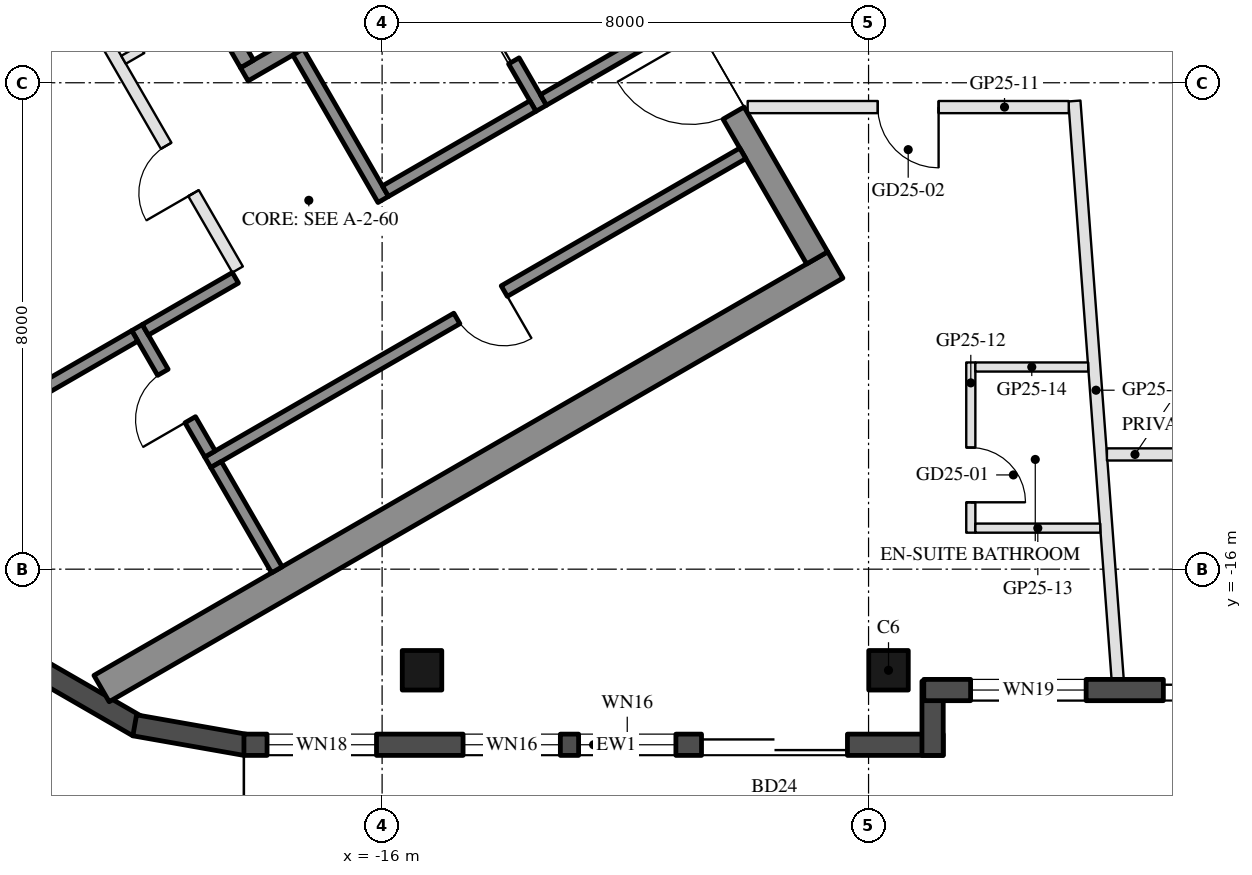
"""IFC4 building model, lengths in metres.
Left out: names, types, materials, properties, quantities, classifications, styles, units other than length and angle.
Written with IfcOpenShell. Run it as: python <this file> out.ifc"""

import sys

from ifc_helpers import new_model, si_unit, direction, frame, frame_2d, origin, origin_2d, place, context, subcontext, project, spatial, rectangle, hollow_rectangle, extrude, boolean, halfspace, element, fill, save


model = new_model("IFC4")
c1 = context("Model", 3, precision=1e-05, world=origin(), true_north=direction((0.0, 1.0)))
c2 = subcontext(c1, "Body", "Model", "MODEL_VIEW")
j1 = project(units=[si_unit("LENGTHUNIT", "METRE"), si_unit("PLANEANGLEUNIT", "RADIAN")], contexts=[c1])
p1 = place(None, origin())
s1 = spatial("IfcSite", under=j1, at=p1, CompositionType="ELEMENT")
p2 = place(p1, origin())
s2 = spatial("IfcBuilding", under=s1, at=p2, CompositionType="ELEMENT")
p3 = place(p2, frame((0.0, 0.0, 261.5)))
s3 = spatial("IfcBuildingStorey", under=s2, at=p3, CompositionType="ELEMENT", Elevation=261.5)
p4 = place(p3, frame((-15.344, -17.663, 0.0), z_axis=(0.0, 0.0, 1.0), x_axis=(-1.0, 0.0, 0.0)))
e1 = element("IfcColumn", 1, at=p4, inside=s3, PredefinedType="COLUMN", context=c2, shape_type="SweptSolid", body=[
    boolean("DIFFERENCE", extrude(hollow_rectangle(XDim=0.65, YDim=0.65, WallThickness=0.03, at=origin_2d()), origin(), (0.0, 0.0, 1.0), 3.7), halfspace(frame((0.0, 0.0, 3.653), z_axis=(0.0, 0.0, 1.0), x_axis=(1.0, 0.0, 0.0)), False)),
])
p5 = place(p3, frame((-7.672, -17.663, 0.0), z_axis=(0.0, 0.0, 1.0), x_axis=(-1.0, 0.0, 0.0)))
e2 = element("IfcColumn", 2, at=p5, inside=s3, PredefinedType="COLUMN", context=c2, shape_type="SweptSolid", body=[
    boolean("DIFFERENCE", extrude(hollow_rectangle(XDim=0.65, YDim=0.65, WallThickness=0.03, at=origin_2d()), origin(), (0.0, 0.0, 1.0), 3.7), halfspace(frame((0.0, 0.0, 3.66), z_axis=(0.0, 0.0, 1.0), x_axis=(1.0, 0.0, 0.0)), False)),
])
p6 = place(p3, frame((-21.618, -17.662, 0.0), z_axis=(0.0, 0.0, 1.0), x_axis=(0.866080385203, -0.499904757295, 0.0)))
e3 = element("IfcWall", 3, at=p6, inside=s3, PredefinedType="SOLIDWALL", context=c2, shape_type="SweptSolid", body=[
    extrude(rectangle(XDim=1.855, YDim=0.35, at=frame_2d((0.927, 0.0))), origin(), (0.0, 0.0, 1.0), 3.55),
])
p7 = place(p3, frame((-20.069, -18.568, 0.0), z_axis=(0.0, 0.0, 1.0), x_axis=(0.984791508075, -0.173740282098, 0.0)))
e4 = element("IfcWall", 4, at=p7, inside=s3, PredefinedType="SOLIDWALL", context=c2, shape_type="SweptSolid", body=[
    extrude(rectangle(XDim=1.855, YDim=0.35, at=frame_2d((0.927, 0.0))), origin(), (0.0, 0.0, 1.0), 3.55),
])
p8 = place(p3, frame((-18.272, -18.888, 0.0), z_axis=(0.0, 0.0, 1.0), x_axis=(1.0, 0.0, 0.0)))
e5 = element("IfcWall", 5, at=p8, inside=s3, PredefinedType="SOLIDWALL", context=c2, shape_type="SweptSolid", body=[
    extrude(rectangle(XDim=11.5, YDim=0.35, at=frame_2d((5.75, 0.0))), origin(), (0.0, 0.0, 1.0), 3.55),
])
p9 = place(p8, frame((0.38, 0.0, 0.3)))
e6 = element("IfcOpeningElement", 6, at=p9, cuts=e5, PredefinedType="OPENING", context=c2, shape_type="SweptSolid", body=[
    extrude(rectangle(XDim=1.8, YDim=2.65, at=frame_2d((0.9, 1.325))), frame((0.0, 0.185, 0.0), z_axis=(0.0, -1.0, 0.0), x_axis=(1.0, 0.0, 0.0)), (0.0, 0.0, 1.0), 0.37),
])
p10 = place(p8, frame((7.525, 0.0, 0.0)))
e7 = element("IfcOpeningElement", 7, at=p10, cuts=e5, PredefinedType="OPENING", context=c2, shape_type="SweptSolid", body=[
    extrude(rectangle(XDim=2.4, YDim=2.4, at=frame_2d((1.2, 1.2))), frame((0.0, 0.185, 0.0), z_axis=(0.0, -1.0, 0.0), x_axis=(1.0, 0.0, 0.0)), (0.0, 0.0, 1.0), 0.37),
])
p11 = place(p8, frame((3.604, 0.0, 0.3)))
e8 = element("IfcOpeningElement", 8, at=p11, cuts=e5, PredefinedType="OPENING", context=c2, shape_type="SweptSolid", body=[
    extrude(rectangle(XDim=1.6, YDim=2.65, at=frame_2d((0.8, 1.325))), frame((0.0, 0.185, 0.0), z_axis=(0.0, -1.0, 0.0), x_axis=(1.0, 0.0, 0.0)), (0.0, 0.0, 1.0), 0.37),
])
p12 = place(p8, frame((5.504, 0.0, 0.3)))
e9 = element("IfcOpeningElement", 9, at=p12, cuts=e5, PredefinedType="OPENING", context=c2, shape_type="SweptSolid", body=[
    extrude(rectangle(XDim=1.6, YDim=2.65, at=frame_2d((0.8, 1.325))), frame((0.0, 0.185, 0.0), z_axis=(0.0, -1.0, 0.0), x_axis=(1.0, 0.0, 0.0)), (0.0, 0.0, 1.0), 0.37),
])
p13 = place(p3, frame((-6.947, -19.063, 0.0), z_axis=(0.0, 0.0, 1.0), x_axis=(0.0, 1.0, 0.0)))
e10 = element("IfcWall", 10, at=p13, inside=s3, PredefinedType="SOLIDWALL", context=c2, shape_type="SweptSolid", body=[
    extrude(rectangle(XDim=1.22, YDim=0.35, at=frame_2d((0.61, 0.0))), origin(), (0.0, 0.0, 1.0), 3.55),
])
p14 = place(p3, frame((-7.092, -17.988, 0.0), z_axis=(0.0, 0.0, 1.0), x_axis=(1.0, 0.0, 0.0)))
e11 = element("IfcWall", 11, at=p14, inside=s3, PredefinedType="SOLIDWALL", context=c2, shape_type="SweptSolid", body=[
    extrude(rectangle(XDim=6.512, YDim=0.35, at=frame_2d((3.256, 0.0))), origin(), (0.0, 0.0, 1.0), 3.55),
])
p15 = place(p14, frame((0.77, 0.0, 0.3)))
e12 = element("IfcOpeningElement", 12, at=p15, cuts=e11, PredefinedType="OPENING", context=c2, shape_type="SweptSolid", body=[
    extrude(rectangle(XDim=1.9, YDim=2.65, at=frame_2d((0.95, 1.325))), frame((0.0, 0.185, 0.0), z_axis=(0.0, -1.0, 0.0), x_axis=(1.0, 0.0, 0.0)), (0.0, 0.0, 1.0), 0.37),
])
p16 = place(p14, frame((3.94, 0.0, 0.0)))
e13 = element("IfcOpeningElement", 13, at=p16, cuts=e11, PredefinedType="OPENING", context=c2, shape_type="SweptSolid", body=[
    extrude(rectangle(XDim=1.5, YDim=2.4, at=frame_2d((0.75, 1.2))), frame((0.0, 0.185, 0.0), z_axis=(0.0, -1.0, 0.0), x_axis=(1.0, 0.0, 0.0)), (0.0, 0.0, 1.0), 0.37),
])
for number, where, z_axis, x_axis in (
    (14, (-13.797, -1.903, 0.0), (0.0, 0.0, 1.0), (-0.866, -0.5, 0.0)),
    (15, (-8.547, -10.997, 0.0), (0.0, 0.0, 1.0), (-0.866, -0.5, 0.0)),
):
    element("IfcWall", number, at=place(p3, frame(where, z_axis=z_axis, x_axis=x_axis)), inside=s3, PredefinedType="SHEAR", context=c2, shape_type="SweptSolid", body=[
        extrude(rectangle(XDim=13.934, YDim=0.5, at=frame_2d((6.967, 0.0))), origin(), (0.0, 0.0, 1.0), 3.5),
    ])
p17 = place(p3, frame((-13.845, -2.22, 0.0), z_axis=(0.0, 0.0, 1.0), x_axis=(0.500004234368, -0.866022959057, 0.0)))
e16 = element("IfcWall", 16, at=p17, inside=s3, PredefinedType="SHEAR", context=c2, shape_type="SweptSolid", body=[
    extrude(rectangle(XDim=10.0, YDim=0.4, at=frame_2d((5.0, 0.0))), origin(), (0.0, 0.0, 1.0), 3.5),
])
p18 = place(p17, frame((3.55, 0.0, 0.0)))
e17 = element("IfcOpeningElement", 17, at=p18, cuts=e16, PredefinedType="OPENING", context=c2, shape_type="SweptSolid", body=[
    extrude(rectangle(XDim=1.1, YDim=2.1, at=frame_2d((0.55, 1.05))), frame((0.0, 0.21, 0.0), z_axis=(0.0, -1.0, 0.0), x_axis=(1.0, 0.0, 0.0)), (0.0, 0.0, 1.0), 0.42),
])
p19 = place(p17, frame((5.85, 0.0, 0.0)))
e18 = element("IfcOpeningElement", 18, at=p19, cuts=e16, PredefinedType="OPENING", context=c2, shape_type="SweptSolid", body=[
    extrude(rectangle(XDim=1.4, YDim=2.1, at=frame_2d((0.7, 1.05))), frame((0.0, 0.21, 0.0), z_axis=(0.0, -1.0, 0.0), x_axis=(1.0, 0.0, 0.0)), (0.0, 0.0, 1.0), 0.42),
])
p20 = place(p3, frame((-12.681, -4.636, 0.0), z_axis=(0.0, 0.0, 1.0), x_axis=(-0.866021702275, -0.500006411147, 0.0)))
e19 = element("IfcWall", 19, at=p20, inside=s3, PredefinedType="SHEAR", context=c2, shape_type="SweptSolid", body=[
    extrude(rectangle(XDim=6.45, YDim=0.25, at=frame_2d((3.225, 0.0))), origin(), (0.0, 0.0, 1.0), 3.5),
])
p21 = place(p20, frame((0.3, 0.0, 0.0)))
e20 = element("IfcOpeningElement", 20, at=p21, cuts=e19, PredefinedType="OPENING", context=c2, shape_type="SweptSolid", body=[
    extrude(rectangle(XDim=1.0, YDim=2.1, at=frame_2d((0.5, 1.05))), frame((0.0, 0.135, 0.0), z_axis=(0.0, -1.0, 0.0), x_axis=(1.0, 0.0, 0.0)), (0.0, 0.0, 1.0), 0.27),
])
p22 = place(p3, frame((-19.496, -5.482, 0.0), z_axis=(0.0, 0.0, 1.0), x_axis=(0.499990435942, -0.866030925526, 0.0)))
e21 = element("IfcWall", 21, at=p22, inside=s3, PredefinedType="SHEAR", context=c2, shape_type="SweptSolid", body=[
    extrude(rectangle(XDim=2.55, YDim=0.25, at=frame_2d((1.275, 0.0))), origin(), (0.0, 0.0, 1.0), 3.5),
])
p23 = place(p3, frame((-17.381, -7.495, 0.0), z_axis=(0.0, 0.0, 1.0), x_axis=(0.500011755427, -0.866018616679, 0.0)))
e22 = element("IfcWall", 22, at=p23, inside=s3, PredefinedType="SHEAR", context=c2, shape_type="SweptSolid", body=[
    extrude(rectangle(XDim=2.8, YDim=0.2, at=frame_2d((1.4, 0.0))), origin(), (0.0, 0.0, 1.0), 3.5),
])
p24 = place(p3, frame((-14.783, -5.995, 0.0), z_axis=(0.0, 0.0, 1.0), x_axis=(0.49994636267, -0.866056369097, 0.0)))
e23 = element("IfcWall", 23, at=p24, inside=s3, PredefinedType="SHEAR", context=c2, shape_type="SweptSolid", body=[
    extrude(rectangle(XDim=2.8, YDim=0.2, at=frame_2d((1.4, 0.0))), origin(), (0.0, 0.0, 1.0), 3.5),
])
p25 = place(p24, frame((0.7, 0.0, 0.0)))
e24 = element("IfcOpeningElement", 24, at=p25, cuts=e23, PredefinedType="OPENING", context=c2, shape_type="SweptSolid", body=[
    extrude(rectangle(XDim=1.2, YDim=2.1, at=frame_2d((0.6, 1.05))), frame((0.0, 0.11, 0.0), z_axis=(0.0, -1.0, 0.0), x_axis=(1.0, 0.0, 0.0)), (0.0, 0.0, 1.0), 0.22),
])
p26 = place(p3, frame((-13.52, -8.383, 0.0), z_axis=(0.0, 0.0, 1.0), x_axis=(-0.866034573852, -0.49998411664, 0.0)))
e25 = element("IfcWall", 25, at=p26, inside=s3, PredefinedType="SHEAR", context=c2, shape_type="SweptSolid", body=[
    extrude(rectangle(XDim=2.8, YDim=0.2, at=frame_2d((1.4, 0.0))), origin(), (0.0, 0.0, 1.0), 3.5),
])
p27 = place(p3, frame((-11.268, -7.083, 0.0), z_axis=(0.0, 0.0, 1.0), x_axis=(-0.866050077142, -0.499957262057, 0.0)))
e26 = element("IfcWall", 26, at=p27, inside=s3, PredefinedType="SHEAR", context=c2, shape_type="SweptSolid", body=[
    extrude(rectangle(XDim=2.4, YDim=0.2, at=frame_2d((1.2, 0.0))), origin(), (0.0, 0.0, 1.0), 3.5),
])
p28 = place(p3, frame((-10.068, -9.162, 0.0), z_axis=(0.0, 0.0, 1.0), x_axis=(-0.866032725843, -0.499987317609, 0.0)))
e27 = element("IfcWall", 27, at=p28, inside=s3, PredefinedType="SHEAR", context=c2, shape_type="SweptSolid", body=[
    extrude(rectangle(XDim=10.16, YDim=0.2, at=frame_2d((5.08, 0.0))), origin(), (0.0, 0.0, 1.0), 3.5),
])
p29 = place(p28, frame((4.53, 0.0, 0.0)))
e28 = element("IfcOpeningElement", 28, at=p29, cuts=e27, PredefinedType="OPENING", context=c2, shape_type="SweptSolid", body=[
    extrude(rectangle(XDim=0.9, YDim=2.1, at=frame_2d((0.45, 1.05))), frame((0.0, 0.11, 0.0), z_axis=(0.0, -1.0, 0.0), x_axis=(1.0, 0.0, 0.0)), (0.0, 0.0, 1.0), 0.22),
])
p30 = place(p3, frame((-20.031, -12.026, 0.0), z_axis=(0.0, 0.0, 1.0), x_axis=(0.500033551112, -0.866006032174, 0.0)))
e29 = element("IfcWall", 29, at=p30, inside=s3, PredefinedType="SHEAR", context=c2, shape_type="SweptSolid", body=[
    extrude(rectangle(XDim=2.4, YDim=0.2, at=frame_2d((1.2, 0.0))), origin(), (0.0, 0.0, 1.0), 3.5),
])
p31 = place(p30, frame((0.85, 0.0, 0.0)))
e30 = element("IfcOpeningElement", 30, at=p31, cuts=e29, PredefinedType="OPENING", context=c2, shape_type="SweptSolid", body=[
    extrude(rectangle(XDim=0.9, YDim=2.1, at=frame_2d((0.45, 1.05))), frame((0.0, 0.11, 0.0), z_axis=(0.0, -1.0, 0.0), x_axis=(1.0, 0.0, 0.0)), (0.0, 0.0, 1.0), 0.22),
])
p32 = place(p3, frame((-18.413, -11.208, 0.0), z_axis=(0.0, 0.0, 1.0), x_axis=(-0.866038183914, -0.499977863513, 0.0)))
e31 = element("IfcWall", 31, at=p32, inside=s3, PredefinedType="SHEAR", context=c2, shape_type="SweptSolid", body=[
    extrude(rectangle(XDim=1.71, YDim=0.2, at=frame_2d((0.855, 0.0))), origin(), (0.0, 0.0, 1.0), 3.5),
])
p33 = place(p3, frame((-18.73, -14.278, 0.0), z_axis=(0.0, 0.0, 1.0), x_axis=(0.50002537861, -0.866010750942, 0.0)))
e32 = element("IfcWall", 32, at=p33, inside=s3, PredefinedType="SHEAR", context=c2, shape_type="SweptSolid", body=[
    extrude(rectangle(XDim=2.0, YDim=0.2, at=frame_2d((1.0, 0.0))), origin(), (0.0, 0.0, 1.0), 3.5),
])
p34 = place(p3, frame((-20.067, -12.163, 0.0), z_axis=(0.0, 0.0, 1.0), x_axis=(-0.866079196458, -0.49990681678, 0.0)))
e33 = element("IfcWall", 33, at=p34, inside=s3, PredefinedType="SHEAR", context=c2, shape_type="SweptSolid", body=[
    extrude(rectangle(XDim=2.216, YDim=0.2, at=frame_2d((1.108, 0.0))), origin(), (0.0, 0.0, 1.0), 3.5),
])
p35 = place(p3, frame((-21.076, -6.395, 0.0), z_axis=(0.0, 0.0, 1.0), x_axis=(0.50001468107, -0.866016927499, 0.0)))
e34 = element("IfcWall", 34, at=p35, inside=s3, PredefinedType="PARTITIONING", context=c2, shape_type="SweptSolid", body=[
    extrude(rectangle(XDim=5.4, YDim=0.2, at=frame_2d((2.7, 0.0))), origin(), (0.0, 0.0, 1.0), 3.5),
])
p36 = place(p35, frame((3.05, 0.0, 0.0)))
e35 = element("IfcOpeningElement", 35, at=p36, cuts=e34, PredefinedType="OPENING", context=c2, shape_type="SweptSolid", body=[
    extrude(rectangle(XDim=0.9, YDim=2.1, at=frame_2d((0.45, 1.05))), frame((0.0, 0.11, 0.0), z_axis=(0.0, -1.0, 0.0), x_axis=(1.0, 0.0, 0.0)), (0.0, 0.0, 1.0), 0.22),
])
p37 = place(p3, frame((-18.866, -6.822, 0.0), z_axis=(0.0, 0.0, 1.0), x_axis=(-0.866028054938, -0.499995408039, 0.0)))
e36 = element("IfcWall", 36, at=p37, inside=s3, PredefinedType="PARTITIONING", context=c2, shape_type="SweptSolid", body=[
    extrude(rectangle(XDim=1.6, YDim=0.15, at=frame_2d((0.8, 0.0))), origin(), (0.0, 0.0, 1.0), 3.5),
])
p38 = place(p37, frame((0.35, 0.0, 0.0)))
e37 = element("IfcOpeningElement", 37, at=p38, cuts=e36, PredefinedType="OPENING", context=c2, shape_type="SweptSolid", body=[
    extrude(rectangle(XDim=0.9, YDim=2.1, at=frame_2d((0.45, 1.05))), frame((0.0, 0.085, 0.0), z_axis=(0.0, -1.0, 0.0), x_axis=(1.0, 0.0, 0.0)), (0.0, 0.0, 1.0), 0.17),
])
p39 = place(p3, frame((-3.903, -17.813, 0.0), z_axis=(0.0, 0.0, 1.0), x_axis=(-0.074602257677, 0.997213368918, 0.0)))
e38 = element("IfcWall", 38, at=p39, inside=s3, PredefinedType="PARTITIONING", context=c2, shape_type="SweptSolid", body=[
    extrude(rectangle(XDim=9.54, YDim=0.2, at=frame_2d((4.77, 0.0))), origin(), (0.0, 0.0, 1.0), 3.0),
])
p40 = place(p3, frame((-4.708, -8.4, 0.0), z_axis=(0.0, 0.0, 1.0), x_axis=(-1.0, 0.0, 0.0)))
e39 = element("IfcWall", 39, at=p40, inside=s3, PredefinedType="PARTITIONING", context=c2, shape_type="SweptSolid", body=[
    extrude(rectangle(XDim=5.281, YDim=0.2, at=frame_2d((2.64, 0.0))), origin(), (0.0, 0.0, 1.0), 3.0),
])
p41 = place(p40, frame((2.14, 0.0, 0.0)))
e40 = element("IfcOpeningElement", 40, at=p41, cuts=e39, PredefinedType="OPENING", context=c2, shape_type="SweptSolid", body=[
    extrude(rectangle(XDim=1.0, YDim=2.1, at=frame_2d((0.5, 1.05))), frame((0.0, 0.11, 0.0), z_axis=(0.0, -1.0, 0.0), x_axis=(1.0, 0.0, 0.0)), (0.0, 0.0, 1.0), 0.22),
])
p42 = place(p3, frame((-6.319, -12.6, 0.0), z_axis=(0.0, 0.0, 1.0), x_axis=(0.0, -1.0, 0.0)))
e41 = element("IfcWall", 41, at=p42, inside=s3, PredefinedType="PARTITIONING", context=c2, shape_type="SweptSolid", body=[
    extrude(rectangle(XDim=2.8, YDim=0.15, at=frame_2d((1.4, 0.0))), origin(), (0.0, 0.0, 1.0), 3.55),
])
p43 = place(p42, frame((1.4, 0.0, 0.0)))
e42 = element("IfcOpeningElement", 42, at=p43, cuts=e41, PredefinedType="OPENING", context=c2, shape_type="SweptSolid", body=[
    extrude(rectangle(XDim=0.9, YDim=2.1, at=frame_2d((0.45, 1.05))), frame((0.0, 0.085, 0.0), z_axis=(0.0, -1.0, 0.0), x_axis=(1.0, 0.0, 0.0)), (0.0, 0.0, 1.0), 0.17),
])
p44 = place(p3, frame((-6.243, -15.325, 0.0), z_axis=(0.0, 0.0, 1.0), x_axis=(1.0, 0.0, 0.0)))
e43 = element("IfcWall", 43, at=p44, inside=s3, PredefinedType="PARTITIONING", context=c2, shape_type="SweptSolid", body=[
    extrude(rectangle(XDim=2.054, YDim=0.15, at=frame_2d((1.027, 0.0))), origin(), (0.0, 0.0, 1.0), 3.55),
])
p45 = place(p3, frame((-6.243, -12.675, 0.0), z_axis=(0.0, 0.0, 1.0), x_axis=(1.0, 0.0, 0.0)))
e44 = element("IfcWall", 44, at=p45, inside=s3, PredefinedType="PARTITIONING", context=c2, shape_type="SweptSolid", body=[
    extrude(rectangle(XDim=1.855, YDim=0.15, at=frame_2d((0.928, 0.0))), origin(), (0.0, 0.0, 1.0), 3.55),
])
p46 = place(p3, frame((-0.235, -14.113, 0.0), z_axis=(0.0, 0.0, 1.0), x_axis=(-1.0, 0.0, 0.0)))
e45 = element("IfcWall", 45, at=p46, inside=s3, PredefinedType="PARTITIONING", context=c2, shape_type="SweptSolid", body=[
    extrude(rectangle(XDim=3.845, YDim=0.2, at=frame_2d((1.922, 0.0))), origin(), (0.0, 0.0, 1.0), 3.0),
])
p47 = place(p46, frame((1.422, 0.0, 0.0)))
e46 = element("IfcOpeningElement", 46, at=p47, cuts=e45, PredefinedType="OPENING", context=c2, shape_type="SweptSolid", body=[
    extrude(rectangle(XDim=1.0, YDim=2.1, at=frame_2d((0.5, 1.05))), frame((0.0, 0.11, 0.0), z_axis=(0.0, -1.0, 0.0), x_axis=(1.0, 0.0, 0.0)), (0.0, 0.0, 1.0), 0.22),
])
p48 = place(p9, origin())
e47 = element("IfcWindow", 47, at=p48, inside=s3, PartitioningType="SINGLE_PANEL", PredefinedType="WINDOW", context=c2, shape_type="SweptSolid", body=[
    extrude(rectangle(XDim=1.8, YDim=2.65, at=frame_2d((0.9, 1.325))), frame((0.0, 0.03, 0.0), z_axis=(0.0, -1.0, 0.0), x_axis=(1.0, 0.0, 0.0)), (0.0, 0.0, 1.0), 0.06),
])
fill(e6, e47)
p49 = place(p10, frame((2.4, 0.0, 0.0), z_axis=(0.0, 0.0, 1.0), x_axis=(-1.0, 0.0, 0.0)))
e48 = element("IfcDoor", 48, at=p49, inside=s3, OperationType="SLIDING_TO_LEFT", PredefinedType="DOOR", context=c2, shape_type="SweptSolid", body=[
    extrude(rectangle(XDim=2.4, YDim=2.4, at=frame_2d((1.2, 1.2))), frame((0.0, 0.025, 0.0), z_axis=(0.0, -1.0, 0.0), x_axis=(1.0, 0.0, 0.0)), (0.0, 0.0, 1.0), 0.05),
])
fill(e7, e48)
p50 = place(p11, origin())
e49 = element("IfcWindow", 49, at=p50, inside=s3, PartitioningType="SINGLE_PANEL", PredefinedType="WINDOW", context=c2, shape_type="SweptSolid", body=[
    extrude(rectangle(XDim=1.6, YDim=2.65, at=frame_2d((0.8, 1.325))), frame((0.0, 0.03, 0.0), z_axis=(0.0, -1.0, 0.0), x_axis=(1.0, 0.0, 0.0)), (0.0, 0.0, 1.0), 0.06),
])
fill(e8, e49)
p51 = place(p12, origin())
e50 = element("IfcWindow", 50, at=p51, inside=s3, PartitioningType="SINGLE_PANEL", PredefinedType="WINDOW", context=c2, shape_type="SweptSolid", body=[
    extrude(rectangle(XDim=1.6, YDim=2.65, at=frame_2d((0.8, 1.325))), frame((0.0, 0.03, 0.0), z_axis=(0.0, -1.0, 0.0), x_axis=(1.0, 0.0, 0.0)), (0.0, 0.0, 1.0), 0.06),
])
fill(e9, e50)
p52 = place(p15, origin())
e51 = element("IfcWindow", 51, at=p52, inside=s3, PartitioningType="SINGLE_PANEL", PredefinedType="WINDOW", context=c2, shape_type="SweptSolid", body=[
    extrude(rectangle(XDim=1.9, YDim=2.65, at=frame_2d((0.95, 1.325))), frame((0.0, 0.03, 0.0), z_axis=(0.0, -1.0, 0.0), x_axis=(1.0, 0.0, 0.0)), (0.0, 0.0, 1.0), 0.06),
])
fill(e12, e51)
p53 = place(p16, frame((1.5, 0.0, 0.0), z_axis=(0.0, 0.0, 1.0), x_axis=(-1.0, 0.0, 0.0)))
e52 = element("IfcDoor", 52, at=p53, inside=s3, OperationType="SLIDING_TO_LEFT", PredefinedType="DOOR", context=c2, shape_type="SweptSolid", body=[
    extrude(rectangle(XDim=1.5, YDim=2.4, at=frame_2d((0.75, 1.2))), frame((0.0, 0.025, 0.0), z_axis=(0.0, -1.0, 0.0), x_axis=(1.0, 0.0, 0.0)), (0.0, 0.0, 1.0), 0.05),
])
fill(e13, e52)
p54 = place(p25, origin())
e53 = element("IfcDoor", 53, at=p54, inside=s3, OperationType="DOUBLE_DOOR_SLIDING", PredefinedType="DOOR", context=c2, shape_type="SweptSolid", body=[
    extrude(rectangle(XDim=1.2, YDim=2.1, at=frame_2d((0.6, 1.05))), frame((0.0, 0.025, 0.0), z_axis=(0.0, -1.0, 0.0), x_axis=(1.0, 0.0, 0.0)), (0.0, 0.0, 1.0), 0.05),
])
fill(e24, e53)
p55 = place(p29, origin())
e54 = element("IfcDoor", 54, at=p55, inside=s3, OperationType="SINGLE_SWING_LEFT", PredefinedType="DOOR", context=c2, shape_type="SweptSolid", body=[
    extrude(rectangle(XDim=0.9, YDim=2.1, at=frame_2d((0.45, 1.05))), frame((0.0, 0.025, 0.0), z_axis=(0.0, -1.0, 0.0), x_axis=(1.0, 0.0, 0.0)), (0.0, 0.0, 1.0), 0.05),
])
fill(e28, e54)
p56 = place(p31, frame((0.9, 0.0, 0.0), z_axis=(0.0, 0.0, 1.0), x_axis=(-1.0, 0.0, 0.0)))
e55 = element("IfcDoor", 55, at=p56, inside=s3, OperationType="SINGLE_SWING_LEFT", PredefinedType="DOOR", context=c2, shape_type="SweptSolid", body=[
    extrude(rectangle(XDim=0.9, YDim=2.1, at=frame_2d((0.45, 1.05))), frame((0.0, 0.025, 0.0), z_axis=(0.0, -1.0, 0.0), x_axis=(1.0, 0.0, 0.0)), (0.0, 0.0, 1.0), 0.05),
])
fill(e30, e55)
p57 = place(p36, frame((0.9, 0.0, 0.0), z_axis=(0.0, 0.0, 1.0), x_axis=(-1.0, 0.0, 0.0)))
e56 = element("IfcDoor", 56, at=p57, inside=s3, OperationType="SINGLE_SWING_LEFT", PredefinedType="DOOR", context=c2, shape_type="SweptSolid", body=[
    extrude(rectangle(XDim=0.9, YDim=2.1, at=frame_2d((0.45, 1.05))), frame((0.0, 0.025, 0.0), z_axis=(0.0, -1.0, 0.0), x_axis=(1.0, 0.0, 0.0)), (0.0, 0.0, 1.0), 0.05),
])
fill(e35, e56)
p58 = place(p19, frame((1.4, 0.0, 0.0), z_axis=(0.0, 0.0, 1.0), x_axis=(-1.0, 0.0, 0.0)))
e57 = element("IfcDoor", 57, at=p58, inside=s3, OperationType="DOUBLE_DOOR_SINGLE_SWING", PredefinedType="DOOR", context=c2, shape_type="SweptSolid", body=[
    extrude(rectangle(XDim=1.4, YDim=2.1, at=frame_2d((0.7, 1.05))), frame((0.0, 0.025, 0.0), z_axis=(0.0, -1.0, 0.0), x_axis=(1.0, 0.0, 0.0)), (0.0, 0.0, 1.0), 0.05),
])
fill(e18, e57)
p59 = place(p43, origin())
e58 = element("IfcDoor", 58, at=p59, inside=s3, OperationType="SINGLE_SWING_RIGHT", PredefinedType="DOOR", context=c2, shape_type="SweptSolid", body=[
    extrude(rectangle(XDim=0.9, YDim=2.1, at=frame_2d((0.45, 1.05))), frame((0.0, 0.025, 0.0), z_axis=(0.0, -1.0, 0.0), x_axis=(1.0, 0.0, 0.0)), (0.0, 0.0, 1.0), 0.05),
])
fill(e42, e58)
p60 = place(p41, origin())
e59 = element("IfcDoor", 59, at=p60, inside=s3, OperationType="SINGLE_SWING_LEFT", PredefinedType="DOOR", context=c2, shape_type="SweptSolid", body=[
    extrude(rectangle(XDim=1.0, YDim=2.1, at=frame_2d((0.5, 1.05))), frame((0.0, 0.025, 0.0), z_axis=(0.0, -1.0, 0.0), x_axis=(1.0, 0.0, 0.0)), (0.0, 0.0, 1.0), 0.05),
])
fill(e40, e59)
save(model, sys.argv[1])
